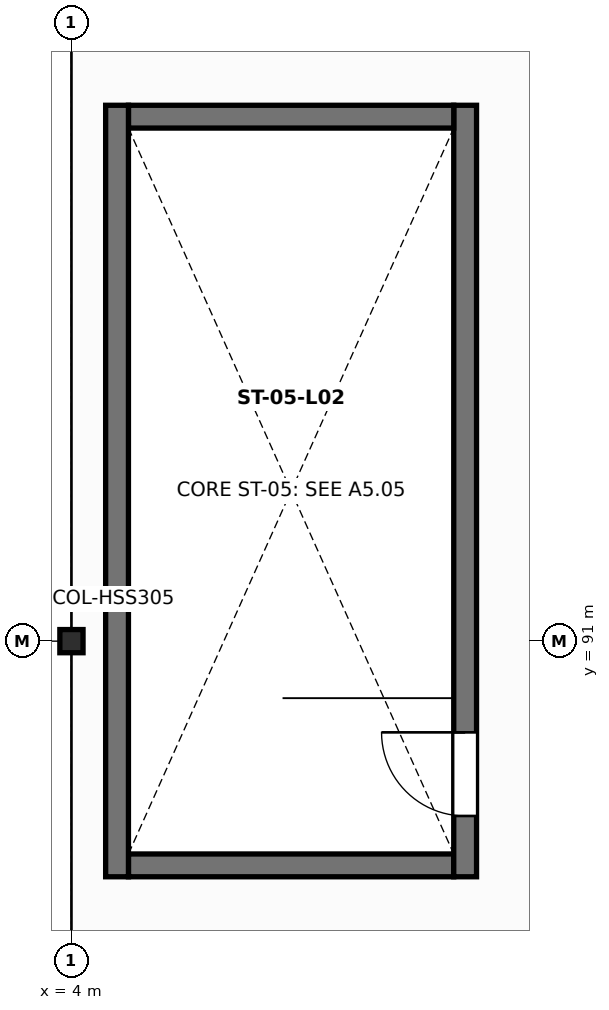
"""IFC4 building model, lengths in metres.
Left out: names, types, materials, properties, quantities, classifications, styles, units other than length and angle.
Written with IfcOpenShell. Run it as: python <this file> out.ifc"""

import sys

from ifc_helpers import new_model, si_unit, direction, frame, frame_2d, origin, origin_2d, place, context, subcontext, project, spatial, rectangle, hollow_rectangle, extrude, element, fill, save


model = new_model("IFC4")
c1 = context("Model", 3, precision=1e-05, world=origin(), true_north=direction((0.0, 1.0)))
c2 = subcontext(c1, "Body", "Model", "MODEL_VIEW")
j1 = project(units=[si_unit("LENGTHUNIT", "METRE"), si_unit("PLANEANGLEUNIT", "RADIAN")], contexts=[c1])
p1 = place(None, origin())
s1 = spatial("IfcSite", under=j1, at=p1, CompositionType="ELEMENT")
p2 = place(p1, origin())
s2 = spatial("IfcBuilding", under=s1, at=p2, CompositionType="ELEMENT")
p3 = place(p2, frame((0.0, 0.0, 11.2)))
s3 = spatial("IfcBuildingStorey", under=s2, at=p3, CompositionType="ELEMENT", Elevation=11.2)
p4 = place(p3, frame((4.0, 91.0, 0.0), z_axis=(0.0, 0.0, 1.0), x_axis=(1.0, 0.0, 0.0)))
e1 = element("IfcColumn", 1, at=p4, inside=s3, PredefinedType="COLUMN", context=c2, shape_type="SweptSolid", body=[
    extrude(hollow_rectangle(XDim=0.305, YDim=0.305, WallThickness=0.012, at=origin_2d()), origin(), (0.0, 0.0, 1.0), 4.3),
])
p5 = place(p3, frame((4.75, 88.05, 0.0), z_axis=(0.0, 0.0, 1.0), x_axis=(1.0, 0.0, 0.0)))
e2 = element("IfcWall", 2, at=p5, inside=s3, PredefinedType="SHEAR", context=c2, shape_type="SweptSolid", body=[
    extrude(rectangle(XDim=4.28, YDim=0.3, at=frame_2d((2.14, 0.0))), origin(), (0.0, 0.0, 1.0), 4.12),
])
p6 = place(p3, frame((9.18, 87.9, 0.0), z_axis=(0.0, 0.0, 1.0), x_axis=(0.0, 1.0, 0.0)))
e3 = element("IfcWall", 3, at=p6, inside=s3, PredefinedType="SHEAR", context=c2, shape_type="SweptSolid", body=[
    extrude(rectangle(XDim=10.15, YDim=0.3, at=frame_2d((5.075, 0.0))), origin(), (0.0, 0.0, 1.0), 4.12),
])
p7 = place(p6, frame((0.8, 0.0, 0.0)))
e4 = element("IfcOpeningElement", 4, at=p7, cuts=e3, PredefinedType="OPENING", context=c2, shape_type="SweptSolid", body=[
    extrude(rectangle(XDim=1.1, YDim=2.15, at=frame_2d((0.55, 1.075))), frame((0.0, 0.16, 0.0), z_axis=(0.0, -1.0, 0.0), x_axis=(1.0, 0.0, 0.0)), (0.0, 0.0, 1.0), 0.32),
])
p8 = place(p3, frame((9.03, 97.9, 0.0), z_axis=(0.0, 0.0, 1.0), x_axis=(-1.0, 0.0, 0.0)))
e5 = element("IfcWall", 5, at=p8, inside=s3, PredefinedType="SHEAR", context=c2, shape_type="SweptSolid", body=[
    extrude(rectangle(XDim=4.28, YDim=0.3, at=frame_2d((2.14, 0.0))), origin(), (0.0, 0.0, 1.0), 4.12),
])
p9 = place(p3, frame((4.6, 98.05, 0.0), z_axis=(0.0, 0.0, 1.0), x_axis=(0.0, -1.0, 0.0)))
e6 = element("IfcWall", 6, at=p9, inside=s3, PredefinedType="SHEAR", context=c2, shape_type="SweptSolid", body=[
    extrude(rectangle(XDim=10.15, YDim=0.3, at=frame_2d((5.075, 0.0))), origin(), (0.0, 0.0, 1.0), 4.12),
])
p10 = place(p7, origin())
e7 = element("IfcDoor", 7, at=p10, inside=s3, OperationType="SINGLE_SWING_RIGHT", PredefinedType="DOOR", context=c2, shape_type="SweptSolid", body=[
    extrude(rectangle(XDim=1.1, YDim=2.15, at=frame_2d((0.55, 1.075))), frame((0.0, 0.025, 0.0), z_axis=(0.0, -1.0, 0.0), x_axis=(1.0, 0.0, 0.0)), (0.0, 0.0, 1.0), 0.05),
])
fill(e4, e7)
save(model, sys.argv[1])
